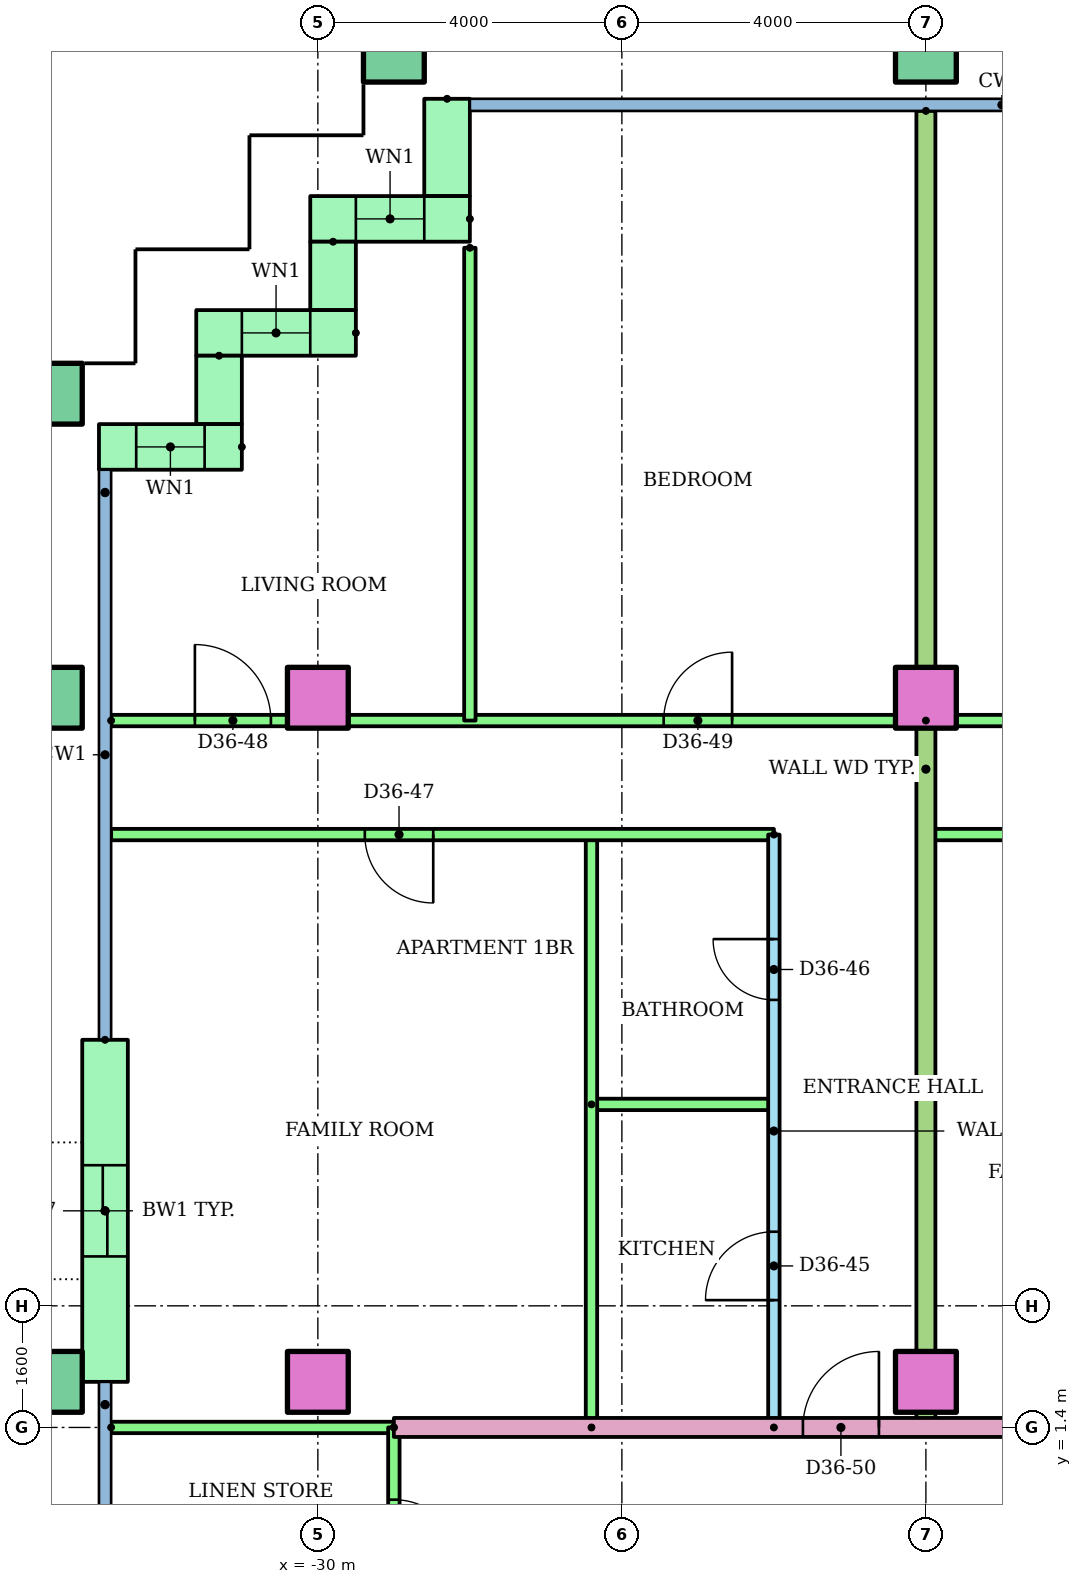
"""IFC4 building model, lengths in metres.
Left out: names, types, materials, properties, quantities, classifications, styles, units other than length and angle.
Written with IfcOpenShell. Run it as: python <this file> out.ifc"""

import sys

from ifc_helpers import new_model, si_unit, direction, frame, frame_2d, origin, origin_2d, place, context, subcontext, project, spatial, rectangle, hollow_rectangle, extrude, element, fill, save


model = new_model("IFC4")
c1 = context("Model", 3, precision=1e-05, world=origin(), true_north=direction((0.0, 1.0)))
c2 = subcontext(c1, "Body", "Model", "MODEL_VIEW")
j1 = project(units=[si_unit("LENGTHUNIT", "METRE"), si_unit("PLANEANGLEUNIT", "RADIAN")], contexts=[c1])
p1 = place(None, origin())
s1 = spatial("IfcSite", under=j1, at=p1, CompositionType="ELEMENT")
p2 = place(p1, origin())
s2 = spatial("IfcBuilding", under=s1, at=p2, CompositionType="ELEMENT")
p3 = place(p2, frame((0.0, 0.0, 139.0)))
s3 = spatial("IfcBuildingStorey", under=s2, at=p3, CompositionType="ELEMENT", Elevation=139.0)
p4 = place(p3, frame((-33.5, 2.0, 0.0)))
e1 = element("IfcColumn", 1, at=p4, inside=s3, PredefinedType="COLUMN", context=c2, shape_type="SweptSolid", body=[
    extrude(hollow_rectangle(XDim=0.8, YDim=0.8, WallThickness=0.04, at=origin_2d()), origin(), (0.0, 0.0, 1.0), 3.2),
])
for number, where in (
    (2, (-30.0, 2.0, 0.0)),
    (3, (-22.0, 2.0, 0.0)),
):
    element("IfcColumn", number, at=place(p3, frame(where)), inside=s3, PredefinedType="COLUMN", context=c2, shape_type="SweptSolid", body=[
        extrude(rectangle(XDim=0.8, YDim=0.8, at=origin_2d()), origin(), (0.0, 0.0, 1.0), 3.2),
    ])
p5 = place(p3, frame((-33.5, 11.0, 0.0)))
e4 = element("IfcColumn", 4, at=p5, inside=s3, PredefinedType="COLUMN", context=c2, shape_type="SweptSolid", body=[
    extrude(hollow_rectangle(XDim=0.8, YDim=0.8, WallThickness=0.04, at=origin_2d()), origin(), (0.0, 0.0, 1.0), 3.2),
])
for number, where in (
    (5, (-30.0, 11.0, 0.0)),
    (6, (-22.0, 11.0, 0.0)),
):
    element("IfcColumn", number, at=place(p3, frame(where)), inside=s3, PredefinedType="COLUMN", context=c2, shape_type="SweptSolid", body=[
        extrude(rectangle(XDim=0.8, YDim=0.8, at=origin_2d()), origin(), (0.0, 0.0, 1.0), 3.2),
    ])
for number, where in (
    (7, (-33.5, 15.0, 0.0)),
    (8, (-29.0, 19.5, 0.0)),
    (9, (-22.0, 19.5, 0.0)),
):
    element("IfcColumn", number, at=place(p3, frame(where)), inside=s3, PredefinedType="COLUMN", context=c2, shape_type="SweptSolid", body=[
        extrude(hollow_rectangle(XDim=0.8, YDim=0.8, WallThickness=0.04, at=origin_2d()), origin(), (0.0, 0.0, 1.0), 3.2),
    ])
p6 = place(p3, frame((-28.3, 18.88, 0.0), z_axis=(0.0, 0.0, 1.0), x_axis=(0.0, -1.0, 0.0)))
e10 = element("IfcWall", 10, at=p6, inside=s3, PredefinedType="STANDARD", context=c2, shape_type="SweptSolid", body=[
    extrude(rectangle(XDim=1.28, YDim=0.6, at=frame_2d((0.64, 0.0))), origin(), (0.0, 0.0, 1.0), 2.92),
])
p7 = place(p3, frame((-28.0, 17.3, 0.0), z_axis=(0.0, 0.0, 1.0), x_axis=(-1.0, 0.0, 0.0)))
e11 = element("IfcWall", 11, at=p7, inside=s3, PredefinedType="STANDARD", context=c2, shape_type="SweptSolid", body=[
    extrude(rectangle(XDim=2.1, YDim=0.6, at=frame_2d((1.05, 0.0))), origin(), (0.0, 0.0, 1.0), 2.92),
])
p8 = place(p7, frame((0.6, 0.0, 0.9)))
e12 = element("IfcOpeningElement", 12, at=p8, cuts=e11, PredefinedType="OPENING", context=c2, shape_type="SweptSolid", body=[
    extrude(rectangle(XDim=0.9, YDim=1.5, at=frame_2d((0.45, 0.75))), frame((0.0, 0.31, 0.0), z_axis=(0.0, -1.0, 0.0), x_axis=(1.0, 0.0, 0.0)), (0.0, 0.0, 1.0), 0.62),
])
p9 = place(p3, frame((-29.8, 17.0, 0.0), z_axis=(0.0, 0.0, 1.0), x_axis=(0.0, -1.0, 0.0)))
e13 = element("IfcWall", 13, at=p9, inside=s3, PredefinedType="STANDARD", context=c2, shape_type="SweptSolid", body=[
    extrude(rectangle(XDim=0.9, YDim=0.6, at=frame_2d((0.45, 0.0))), origin(), (0.0, 0.0, 1.0), 2.92),
])
p10 = place(p3, frame((-29.5, 15.8, 0.0), z_axis=(0.0, 0.0, 1.0), x_axis=(-1.0, 0.0, 0.0)))
e14 = element("IfcWall", 14, at=p10, inside=s3, PredefinedType="STANDARD", context=c2, shape_type="SweptSolid", body=[
    extrude(rectangle(XDim=2.1, YDim=0.6, at=frame_2d((1.05, 0.0))), origin(), (0.0, 0.0, 1.0), 2.92),
])
p11 = place(p10, frame((0.6, 0.0, 0.9)))
e15 = element("IfcOpeningElement", 15, at=p11, cuts=e14, PredefinedType="OPENING", context=c2, shape_type="SweptSolid", body=[
    extrude(rectangle(XDim=0.9, YDim=1.5, at=frame_2d((0.45, 0.75))), frame((0.0, 0.31, 0.0), z_axis=(0.0, -1.0, 0.0), x_axis=(1.0, 0.0, 0.0)), (0.0, 0.0, 1.0), 0.62),
])
p12 = place(p3, frame((-31.3, 15.5, 0.0), z_axis=(0.0, 0.0, 1.0), x_axis=(0.0, -1.0, 0.0)))
e16 = element("IfcWall", 16, at=p12, inside=s3, PredefinedType="STANDARD", context=c2, shape_type="SweptSolid", body=[
    extrude(rectangle(XDim=0.9, YDim=0.6, at=frame_2d((0.45, 0.0))), origin(), (0.0, 0.0, 1.0), 2.92),
])
p13 = place(p3, frame((-31.0, 14.3, 0.0), z_axis=(0.0, 0.0, 1.0), x_axis=(-1.0, 0.0, 0.0)))
e17 = element("IfcWall", 17, at=p13, inside=s3, PredefinedType="STANDARD", context=c2, shape_type="SweptSolid", body=[
    extrude(rectangle(XDim=1.88, YDim=0.6, at=frame_2d((0.94, 0.0))), origin(), (0.0, 0.0, 1.0), 2.92),
])
p14 = place(p13, frame((0.49, 0.0, 0.9)))
e18 = element("IfcOpeningElement", 18, at=p14, cuts=e17, PredefinedType="OPENING", context=c2, shape_type="SweptSolid", body=[
    extrude(rectangle(XDim=0.9, YDim=1.5, at=frame_2d((0.45, 0.75))), frame((0.0, 0.31, 0.0), z_axis=(0.0, -1.0, 0.0), x_axis=(1.0, 0.0, 0.0)), (0.0, 0.0, 1.0), 0.62),
])
p15 = place(p3, frame((-32.8, 6.5, 0.0), z_axis=(0.0, 0.0, 1.0), x_axis=(0.0, -1.0, 0.0)))
e19 = element("IfcWall", 19, at=p15, inside=s3, PredefinedType="STANDARD", context=c2, shape_type="SweptSolid", body=[
    extrude(rectangle(XDim=4.5, YDim=0.6, at=frame_2d((2.25, 0.0))), origin(), (0.0, 0.0, 1.0), 2.92),
])
p16 = place(p15, frame((1.65, 0.0, 0.0)))
e20 = element("IfcOpeningElement", 20, at=p16, cuts=e19, PredefinedType="OPENING", context=c2, shape_type="SweptSolid", body=[
    extrude(rectangle(XDim=1.2, YDim=2.1, at=frame_2d((0.6, 1.05))), frame((0.0, 0.31, 0.0), z_axis=(0.0, -1.0, 0.0), x_axis=(1.0, 0.0, 0.0)), (0.0, 0.0, 1.0), 0.62),
])
p17 = place(p3, frame((-24.0, 1.4, 0.0), z_axis=(0.0, 0.0, 1.0), x_axis=(0.0, 1.0, 0.0)))
e21 = element("IfcWall", 21, at=p17, inside=s3, PredefinedType="PARTITIONING", context=c2, shape_type="SweptSolid", body=[
    extrude(rectangle(XDim=7.8, YDim=0.15, at=frame_2d((3.9, 0.0))), origin(), (0.0, 0.0, 1.0), 2.4),
])
p18 = place(p17, frame((1.675, 0.0, 0.0)))
e22 = element("IfcOpeningElement", 22, at=p18, cuts=e21, PredefinedType="OPENING", context=c2, shape_type="SweptSolid", body=[
    extrude(rectangle(XDim=0.9, YDim=2.1, at=frame_2d((0.45, 1.05))), frame((0.0, 0.085, 0.0), z_axis=(0.0, -1.0, 0.0), x_axis=(1.0, 0.0, 0.0)), (0.0, 0.0, 1.0), 0.17),
])
p19 = place(p17, frame((5.625, 0.0, 0.0)))
e23 = element("IfcOpeningElement", 23, at=p19, cuts=e21, PredefinedType="OPENING", context=c2, shape_type="SweptSolid", body=[
    extrude(rectangle(XDim=0.8, YDim=2.1, at=frame_2d((0.4, 1.05))), frame((0.0, 0.085, 0.0), z_axis=(0.0, -1.0, 0.0), x_axis=(1.0, 0.0, 0.0)), (0.0, 0.0, 1.0), 0.17),
])
p20 = place(p3, frame((-26.4, 5.65, 0.0)))
e24 = element("IfcWall", 24, at=p20, inside=s3, PredefinedType="PARTITIONING", context=c2, shape_type="SweptSolid", body=[
    extrude(rectangle(XDim=2.4, YDim=0.15, at=frame_2d((1.2, 0.0))), origin(), (0.0, 0.0, 1.0), 2.4),
])
p21 = place(p3, frame((-26.4, 1.4, 0.0), z_axis=(0.0, 0.0, 1.0), x_axis=(0.0, 1.0, 0.0)))
e25 = element("IfcWall", 25, at=p21, inside=s3, PredefinedType="PARTITIONING", context=c2, shape_type="SweptSolid", body=[
    extrude(rectangle(XDim=7.8, YDim=0.15, at=frame_2d((3.9, 0.0))), origin(), (0.0, 0.0, 1.0), 2.4),
])
p22 = place(p3, frame((-24.0, 9.2, 0.0), z_axis=(0.0, 0.0, 1.0), x_axis=(-1.0, 0.0, 0.0)))
e26 = element("IfcWall", 26, at=p22, inside=s3, PredefinedType="PARTITIONING", context=c2, shape_type="SweptSolid", body=[
    extrude(rectangle(XDim=8.72, YDim=0.15, at=frame_2d((4.36, 0.0))), origin(), (0.0, 0.0, 1.0), 2.4),
])
p23 = place(p22, frame((4.482, 0.0, 0.0)))
e27 = element("IfcOpeningElement", 27, at=p23, cuts=e26, PredefinedType="OPENING", context=c2, shape_type="SweptSolid", body=[
    extrude(rectangle(XDim=0.9, YDim=2.1, at=frame_2d((0.45, 1.05))), frame((0.0, 0.085, 0.0), z_axis=(0.0, -1.0, 0.0), x_axis=(1.0, 0.0, 0.0)), (0.0, 0.0, 1.0), 0.17),
])
p24 = place(p3, frame((-32.72, 10.7, 0.0)))
e28 = element("IfcWall", 28, at=p24, inside=s3, PredefinedType="PARTITIONING", context=c2, shape_type="SweptSolid", body=[
    extrude(rectangle(XDim=10.72, YDim=0.15, at=frame_2d((5.36, 0.0))), origin(), (0.0, 0.0, 1.0), 2.4),
])
p25 = place(p24, frame((1.102, 0.0, 0.0)))
e29 = element("IfcOpeningElement", 29, at=p25, cuts=e28, PredefinedType="OPENING", context=c2, shape_type="SweptSolid", body=[
    extrude(rectangle(XDim=1.0, YDim=2.1, at=frame_2d((0.5, 1.05))), frame((0.0, 0.085, 0.0), z_axis=(0.0, -1.0, 0.0), x_axis=(1.0, 0.0, 0.0)), (0.0, 0.0, 1.0), 0.17),
])
p26 = place(p24, frame((7.27, 0.0, 0.0)))
e30 = element("IfcOpeningElement", 30, at=p26, cuts=e28, PredefinedType="OPENING", context=c2, shape_type="SweptSolid", body=[
    extrude(rectangle(XDim=0.9, YDim=2.1, at=frame_2d((0.45, 1.05))), frame((0.0, 0.085, 0.0), z_axis=(0.0, -1.0, 0.0), x_axis=(1.0, 0.0, 0.0)), (0.0, 0.0, 1.0), 0.17),
])
p27 = place(p3, frame((-28.0, 16.92, 0.0), z_axis=(0.0, 0.0, 1.0), x_axis=(0.0, -1.0, 0.0)))
e31 = element("IfcWall", 31, at=p27, inside=s3, PredefinedType="PARTITIONING", context=c2, shape_type="SweptSolid", body=[
    extrude(rectangle(XDim=6.22, YDim=0.15, at=frame_2d((3.11, 0.0))), origin(), (0.0, 0.0, 1.0), 2.4),
])
p28 = place(p3, frame((-16.0, 9.2, 0.0), z_axis=(0.0, 0.0, 1.0), x_axis=(-1.0, 0.0, 0.0)))
e32 = element("IfcWall", 32, at=p28, inside=s3, PredefinedType="PARTITIONING", context=c2, shape_type="SweptSolid", body=[
    extrude(rectangle(XDim=6.0, YDim=0.15, at=frame_2d((3.0, 0.0))), origin(), (0.0, 0.0, 1.0), 2.4),
])
p29 = place(p28, frame((3.75, 0.0, 0.0)))
e33 = element("IfcOpeningElement", 33, at=p29, cuts=e32, PredefinedType="OPENING", context=c2, shape_type="SweptSolid", body=[
    extrude(rectangle(XDim=0.9, YDim=2.1, at=frame_2d((0.45, 1.05))), frame((0.0, 0.085, 0.0), z_axis=(0.0, -1.0, 0.0), x_axis=(1.0, 0.0, 0.0)), (0.0, 0.0, 1.0), 0.17),
])
p30 = place(p3, frame((-22.0, 10.7, 0.0)))
e34 = element("IfcWall", 34, at=p30, inside=s3, PredefinedType="PARTITIONING", context=c2, shape_type="SweptSolid", body=[
    extrude(rectangle(XDim=8.0, YDim=0.15, at=frame_2d((4.0, 0.0))), origin(), (0.0, 0.0, 1.0), 2.4),
])
p31 = place(p30, frame((3.5, 0.0, 0.0)))
e35 = element("IfcOpeningElement", 35, at=p31, cuts=e34, PredefinedType="OPENING", context=c2, shape_type="SweptSolid", body=[
    extrude(rectangle(XDim=1.0, YDim=2.1, at=frame_2d((0.5, 1.05))), frame((0.0, 0.085, 0.0), z_axis=(0.0, -1.0, 0.0), x_axis=(1.0, 0.0, 0.0)), (0.0, 0.0, 1.0), 0.17),
])
p32 = place(p3, frame((-22.0, 18.721, 0.0), z_axis=(0.0, 0.0, 1.0), x_axis=(0.0, -1.0, 0.0)))
e36 = element("IfcWall", 36, at=p32, inside=s3, PredefinedType="PARTITIONING", context=c2, shape_type="SweptSolid", body=[
    extrude(rectangle(XDim=17.321, YDim=0.25, at=frame_2d((8.661, 0.0))), origin(), (0.0, 0.0, 1.0), 2.4),
])
p33 = place(p3, frame((-29.0, 1.4, 0.0)))
e37 = element("IfcWall", 37, at=p33, inside=s3, PredefinedType="PARTITIONING", context=c2, shape_type="SweptSolid", body=[
    extrude(rectangle(XDim=15.0, YDim=0.25, at=frame_2d((7.5, 0.0))), origin(), (0.0, 0.0, 1.0), 2.4),
])
p34 = place(p33, frame((5.382, 0.0, 0.0)))
e38 = element("IfcOpeningElement", 38, at=p34, cuts=e37, PredefinedType="OPENING", context=c2, shape_type="SweptSolid", body=[
    extrude(rectangle(XDim=1.0, YDim=2.1, at=frame_2d((0.5, 1.05))), frame((0.0, 0.135, 0.0), z_axis=(0.0, -1.0, 0.0), x_axis=(1.0, 0.0, 0.0)), (0.0, 0.0, 1.0), 0.27),
])
p35 = place(p33, frame((13.5, 0.0, 0.0)))
e39 = element("IfcOpeningElement", 39, at=p35, cuts=e37, PredefinedType="OPENING", context=c2, shape_type="SweptSolid", body=[
    extrude(rectangle(XDim=1.0, YDim=2.1, at=frame_2d((0.5, 1.05))), frame((0.0, 0.135, 0.0), z_axis=(0.0, -1.0, 0.0), x_axis=(1.0, 0.0, 0.0)), (0.0, 0.0, 1.0), 0.27),
])
p36 = place(p3, frame((-32.72, 1.4, 0.0)))
e40 = element("IfcWall", 40, at=p36, inside=s3, PredefinedType="PARTITIONING", context=c2, shape_type="SweptSolid", body=[
    extrude(rectangle(XDim=3.72, YDim=0.15, at=frame_2d((1.86, 0.0))), origin(), (0.0, 0.0, 1.0), 2.4),
])
p37 = place(p3, frame((-29.0, 1.4, 0.0), z_axis=(0.0, 0.0, 1.0), x_axis=(0.0, -1.0, 0.0)))
e41 = element("IfcWall", 41, at=p37, inside=s3, PredefinedType="PARTITIONING", context=c2, shape_type="SweptSolid", body=[
    extrude(rectangle(XDim=2.8, YDim=0.15, at=frame_2d((1.4, 0.0))), origin(), (0.0, 0.0, 1.0), 2.4),
])
p38 = place(p37, frame((0.95, 0.0, 0.0)))
e42 = element("IfcOpeningElement", 42, at=p38, cuts=e41, PredefinedType="OPENING", context=c2, shape_type="SweptSolid", body=[
    extrude(rectangle(XDim=0.9, YDim=2.1, at=frame_2d((0.45, 1.05))), frame((0.0, 0.085, 0.0), z_axis=(0.0, -1.0, 0.0), x_axis=(1.0, 0.0, 0.0)), (0.0, 0.0, 1.0), 0.17),
])
p39 = place(p8, origin())
e43 = element("IfcWindow", 43, at=p39, inside=s3, PartitioningType="SINGLE_PANEL", PredefinedType="WINDOW", context=c2, shape_type="SweptSolid", body=[
    extrude(rectangle(XDim=0.9, YDim=1.5, at=frame_2d((0.45, 0.75))), frame((0.0, 0.03, 0.0), z_axis=(0.0, -1.0, 0.0), x_axis=(1.0, 0.0, 0.0)), (0.0, 0.0, 1.0), 0.06),
])
fill(e12, e43)
p40 = place(p11, origin())
e44 = element("IfcWindow", 44, at=p40, inside=s3, PartitioningType="SINGLE_PANEL", PredefinedType="WINDOW", context=c2, shape_type="SweptSolid", body=[
    extrude(rectangle(XDim=0.9, YDim=1.5, at=frame_2d((0.45, 0.75))), frame((0.0, 0.03, 0.0), z_axis=(0.0, -1.0, 0.0), x_axis=(1.0, 0.0, 0.0)), (0.0, 0.0, 1.0), 0.06),
])
fill(e15, e44)
p41 = place(p14, origin())
e45 = element("IfcWindow", 45, at=p41, inside=s3, PartitioningType="SINGLE_PANEL", PredefinedType="WINDOW", context=c2, shape_type="SweptSolid", body=[
    extrude(rectangle(XDim=0.9, YDim=1.5, at=frame_2d((0.45, 0.75))), frame((0.0, 0.03, 0.0), z_axis=(0.0, -1.0, 0.0), x_axis=(1.0, 0.0, 0.0)), (0.0, 0.0, 1.0), 0.06),
])
fill(e18, e45)
p42 = place(p18, origin())
e46 = element("IfcDoor", 46, at=p42, inside=s3, OperationType="SINGLE_SWING_LEFT", PredefinedType="DOOR", context=c2, shape_type="SweptSolid", body=[
    extrude(rectangle(XDim=0.9, YDim=2.1, at=frame_2d((0.45, 1.05))), frame((0.0, 0.025, 0.0), z_axis=(0.0, -1.0, 0.0), x_axis=(1.0, 0.0, 0.0)), (0.0, 0.0, 1.0), 0.05),
])
fill(e22, e46)
p43 = place(p19, origin())
e47 = element("IfcDoor", 47, at=p43, inside=s3, OperationType="SINGLE_SWING_RIGHT", PredefinedType="DOOR", context=c2, shape_type="SweptSolid", body=[
    extrude(rectangle(XDim=0.8, YDim=2.1, at=frame_2d((0.4, 1.05))), frame((0.0, 0.025, 0.0), z_axis=(0.0, -1.0, 0.0), x_axis=(1.0, 0.0, 0.0)), (0.0, 0.0, 1.0), 0.05),
])
fill(e23, e47)
p44 = place(p23, origin())
e48 = element("IfcDoor", 48, at=p44, inside=s3, OperationType="SINGLE_SWING_LEFT", PredefinedType="DOOR", context=c2, shape_type="SweptSolid", body=[
    extrude(rectangle(XDim=0.9, YDim=2.1, at=frame_2d((0.45, 1.05))), frame((0.0, 0.025, 0.0), z_axis=(0.0, -1.0, 0.0), x_axis=(1.0, 0.0, 0.0)), (0.0, 0.0, 1.0), 0.05),
])
fill(e27, e48)
p45 = place(p25, origin())
e49 = element("IfcDoor", 49, at=p45, inside=s3, OperationType="SINGLE_SWING_LEFT", PredefinedType="DOOR", context=c2, shape_type="SweptSolid", body=[
    extrude(rectangle(XDim=1.0, YDim=2.1, at=frame_2d((0.5, 1.05))), frame((0.0, 0.025, 0.0), z_axis=(0.0, -1.0, 0.0), x_axis=(1.0, 0.0, 0.0)), (0.0, 0.0, 1.0), 0.05),
])
fill(e29, e49)
p46 = place(p26, origin())
e50 = element("IfcDoor", 50, at=p46, inside=s3, OperationType="SINGLE_SWING_RIGHT", PredefinedType="DOOR", context=c2, shape_type="SweptSolid", body=[
    extrude(rectangle(XDim=0.9, YDim=2.1, at=frame_2d((0.45, 1.05))), frame((0.0, 0.025, 0.0), z_axis=(0.0, -1.0, 0.0), x_axis=(1.0, 0.0, 0.0)), (0.0, 0.0, 1.0), 0.05),
])
fill(e30, e50)
p47 = place(p34, origin())
e51 = element("IfcDoor", 51, at=p47, inside=s3, OperationType="SINGLE_SWING_RIGHT", PredefinedType="DOOR", context=c2, shape_type="SweptSolid", body=[
    extrude(rectangle(XDim=1.0, YDim=2.1, at=frame_2d((0.5, 1.05))), frame((0.0, 0.025, 0.0), z_axis=(0.0, -1.0, 0.0), x_axis=(1.0, 0.0, 0.0)), (0.0, 0.0, 1.0), 0.05),
])
fill(e38, e51)
p48 = place(p38, origin())
e52 = element("IfcDoor", 52, at=p48, inside=s3, OperationType="SINGLE_SWING_RIGHT", PredefinedType="DOOR", context=c2, shape_type="SweptSolid", body=[
    extrude(rectangle(XDim=0.9, YDim=2.1, at=frame_2d((0.45, 1.05))), frame((0.0, 0.025, 0.0), z_axis=(0.0, -1.0, 0.0), x_axis=(1.0, 0.0, 0.0)), (0.0, 0.0, 1.0), 0.05),
])
fill(e42, e52)
p49 = place(p16, origin())
e53 = element("IfcDoor", 53, at=p49, inside=s3, OperationType="SLIDING_TO_LEFT", PredefinedType="DOOR", context=c2, shape_type="SweptSolid", body=[
    extrude(rectangle(XDim=1.2, YDim=2.1, at=frame_2d((0.6, 1.05))), frame((0.0, 0.025, 0.0), z_axis=(0.0, -1.0, 0.0), x_axis=(1.0, 0.0, 0.0)), (0.0, 0.0, 1.0), 0.05),
])
fill(e20, e53)
save(model, sys.argv[1])
